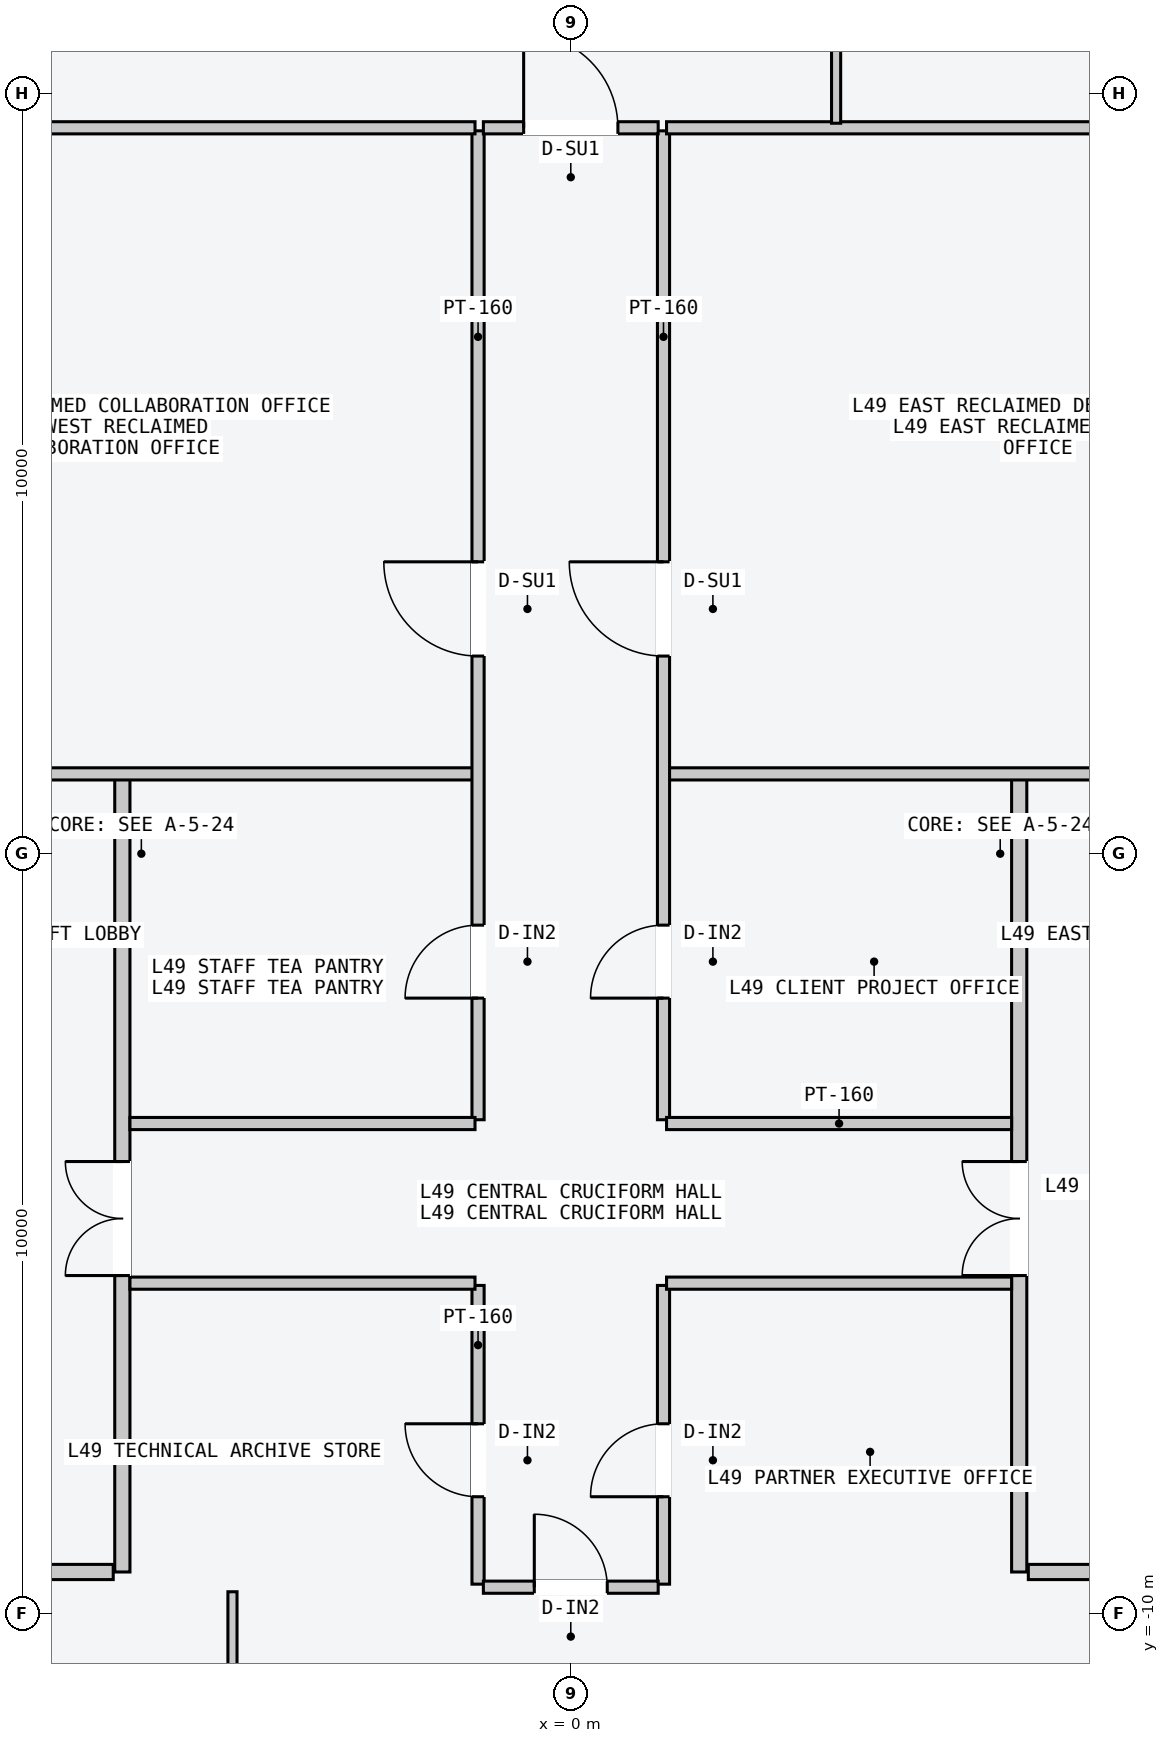
"""IFC4 building model, lengths in metres.
Left out: names, types, materials, properties, quantities, classifications, styles, units other than length and angle.
Written with IfcOpenShell. Run it as: python <this file> out.ifc"""

import sys

from ifc_helpers import new_model, si_unit, direction, frame, frame_2d, origin, place, context, subcontext, project, spatial, rectangle, extrude, element, fill, save


model = new_model("IFC4")
c1 = context("Model", 3, precision=1e-05, world=origin(), true_north=direction((0.0, 1.0)))
c2 = subcontext(c1, "Body", "Model", "MODEL_VIEW")
j1 = project(units=[si_unit("LENGTHUNIT", "METRE"), si_unit("PLANEANGLEUNIT", "RADIAN")], contexts=[c1])
p1 = place(None, origin())
s1 = spatial("IfcSite", under=j1, at=p1, CompositionType="ELEMENT")
p2 = place(p1, origin())
s2 = spatial("IfcBuilding", under=s1, at=p2, CompositionType="ELEMENT")
p3 = place(p2, frame((0.0, 0.0, 187.5)))
s3 = spatial("IfcBuildingStorey", under=s2, at=p3, CompositionType="ELEMENT", Elevation=187.5)
p4 = place(p3, frame((-5.9, -9.45, 0.0), z_axis=(0.0, 0.0, 1.0), x_axis=(0.0, 1.0, 0.0)))
e1 = element("IfcWall", 1, at=p4, inside=s3, PredefinedType="PARTITIONING", context=c2, shape_type="SweptSolid", body=[
    extrude(rectangle(XDim=10.5, YDim=0.2, at=frame_2d((5.25, 0.0))), origin(), (0.0, 0.0, 1.0), 3.4),
])
p5 = place(p4, frame((3.9, 0.0, 0.0)))
e2 = element("IfcOpeningElement", 2, at=p5, cuts=e1, PredefinedType="OPENING", context=c2, shape_type="SweptSolid", body=[
    extrude(rectangle(XDim=1.5, YDim=2.2, at=frame_2d((0.75, 1.1))), frame((0.0, 0.11, 0.0), z_axis=(0.0, -1.0, 0.0), x_axis=(1.0, 0.0, 0.0)), (0.0, 0.0, 1.0), 0.22),
])
p6 = place(p3, frame((-6.02, -9.45, 0.0), z_axis=(0.0, 0.0, 1.0), x_axis=(-1.0, 0.0, 0.0)))
e3 = element("IfcWall", 3, at=p6, inside=s3, PredefinedType="PARTITIONING", context=c2, shape_type="SweptSolid", body=[
    extrude(rectangle(XDim=1.8, YDim=0.2, at=frame_2d((0.9, 0.0))), origin(), (0.0, 0.0, 1.0), 3.4),
])
p7 = place(p3, frame((5.9, -9.45, 0.0), z_axis=(0.0, 0.0, 1.0), x_axis=(0.0, 1.0, 0.0)))
e4 = element("IfcWall", 4, at=p7, inside=s3, PredefinedType="PARTITIONING", context=c2, shape_type="SweptSolid", body=[
    extrude(rectangle(XDim=10.5, YDim=0.2, at=frame_2d((5.25, 0.0))), origin(), (0.0, 0.0, 1.0), 3.4),
])
p8 = place(p7, frame((3.9, 0.0, 0.0)))
e5 = element("IfcOpeningElement", 5, at=p8, cuts=e4, PredefinedType="OPENING", context=c2, shape_type="SweptSolid", body=[
    extrude(rectangle(XDim=1.5, YDim=2.2, at=frame_2d((0.75, 1.1))), frame((0.0, 0.11, 0.0), z_axis=(0.0, -1.0, 0.0), x_axis=(1.0, 0.0, 0.0)), (0.0, 0.0, 1.0), 0.22),
])
p9 = place(p3, frame((6.02, -9.45, 0.0), z_axis=(0.0, 0.0, 1.0), x_axis=(1.0, 0.0, 0.0)))
e6 = element("IfcWall", 6, at=p9, inside=s3, PredefinedType="PARTITIONING", context=c2, shape_type="SweptSolid", body=[
    extrude(rectangle(XDim=1.8, YDim=0.2, at=frame_2d((0.9, 0.0))), origin(), (0.0, 0.0, 1.0), 3.4),
])
p10 = place(p3, frame((-10.05, 1.05, 0.0), z_axis=(0.0, 0.0, 1.0), x_axis=(1.0, 0.0, 0.0)))
e7 = element("IfcWall", 7, at=p10, inside=s3, PredefinedType="PARTITIONING", context=c2, shape_type="SweptSolid", body=[
    extrude(rectangle(XDim=8.79, YDim=0.16, at=frame_2d((4.395, 0.0))), origin(), (0.0, 0.0, 1.0), 3.4),
])
p11 = place(p3, frame((-1.22, -3.5, 0.0), z_axis=(0.0, 0.0, 1.0), x_axis=(0.0, 1.0, 0.0)))
e8 = element("IfcWall", 8, at=p11, inside=s3, PredefinedType="PARTITIONING", context=c2, shape_type="SweptSolid", body=[
    extrude(rectangle(XDim=13.01, YDim=0.16, at=frame_2d((6.505, 0.0))), origin(), (0.0, 0.0, 1.0), 3.4),
])
p12 = place(p11, frame((6.1, 0.0, 0.0)))
e9 = element("IfcOpeningElement", 9, at=p12, cuts=e8, PredefinedType="OPENING", context=c2, shape_type="SweptSolid", body=[
    extrude(rectangle(XDim=1.24, YDim=2.24, at=frame_2d((0.62, 1.12))), frame((0.0, 0.09, 0.0), z_axis=(0.0, -1.0, 0.0), x_axis=(1.0, 0.0, 0.0)), (0.0, 0.0, 1.0), 0.18),
])
p13 = place(p11, frame((1.6, 0.0, 0.0)))
e10 = element("IfcOpeningElement", 10, at=p13, cuts=e8, PredefinedType="OPENING", context=c2, shape_type="SweptSolid", body=[
    extrude(rectangle(XDim=0.96, YDim=2.18, at=frame_2d((0.48, 1.09))), frame((0.0, 0.09, 0.0), z_axis=(0.0, -1.0, 0.0), x_axis=(1.0, 0.0, 0.0)), (0.0, 0.0, 1.0), 0.18),
])
p14 = place(p3, frame((-7.5, 9.55, 0.0), z_axis=(0.0, 0.0, 1.0), x_axis=(1.0, 0.0, 0.0)))
e11 = element("IfcWall", 11, at=p14, inside=s3, PredefinedType="PARTITIONING", context=c2, shape_type="SweptSolid", body=[
    extrude(rectangle(XDim=6.24, YDim=0.16, at=frame_2d((3.12, 0.0))), origin(), (0.0, 0.0, 1.0), 3.4),
])
p15 = place(p3, frame((-5.8, -3.55, 0.0), z_axis=(0.0, 0.0, 1.0), x_axis=(1.0, 0.0, 0.0)))
e12 = element("IfcWall", 12, at=p15, inside=s3, PredefinedType="PARTITIONING", context=c2, shape_type="SweptSolid", body=[
    extrude(rectangle(XDim=4.54, YDim=0.16, at=frame_2d((2.27, 0.0))), origin(), (0.0, 0.0, 1.0), 3.4),
])
p16 = place(p3, frame((1.26, 1.05, 0.0), z_axis=(0.0, 0.0, 1.0), x_axis=(1.0, 0.0, 0.0)))
e13 = element("IfcWall", 13, at=p16, inside=s3, PredefinedType="PARTITIONING", context=c2, shape_type="SweptSolid", body=[
    extrude(rectangle(XDim=8.8, YDim=0.16, at=frame_2d((4.4, 0.0))), origin(), (0.0, 0.0, 1.0), 3.4),
])
p17 = place(p3, frame((1.22, -3.5, 0.0), z_axis=(0.0, 0.0, 1.0), x_axis=(0.0, 1.0, 0.0)))
e14 = element("IfcWall", 14, at=p17, inside=s3, PredefinedType="PARTITIONING", context=c2, shape_type="SweptSolid", body=[
    extrude(rectangle(XDim=13.01, YDim=0.16, at=frame_2d((6.505, 0.0))), origin(), (0.0, 0.0, 1.0), 3.4),
])
p18 = place(p17, frame((6.1, 0.0, 0.0)))
e15 = element("IfcOpeningElement", 15, at=p18, cuts=e14, PredefinedType="OPENING", context=c2, shape_type="SweptSolid", body=[
    extrude(rectangle(XDim=1.24, YDim=2.24, at=frame_2d((0.62, 1.12))), frame((0.0, 0.09, 0.0), z_axis=(0.0, -1.0, 0.0), x_axis=(1.0, 0.0, 0.0)), (0.0, 0.0, 1.0), 0.18),
])
p19 = place(p17, frame((1.6, 0.0, 0.0)))
e16 = element("IfcOpeningElement", 16, at=p19, cuts=e14, PredefinedType="OPENING", context=c2, shape_type="SweptSolid", body=[
    extrude(rectangle(XDim=0.96, YDim=2.18, at=frame_2d((0.48, 1.09))), frame((0.0, 0.09, 0.0), z_axis=(0.0, -1.0, 0.0), x_axis=(1.0, 0.0, 0.0)), (0.0, 0.0, 1.0), 0.18),
])
p20 = place(p3, frame((1.26, 9.55, 0.0), z_axis=(0.0, 0.0, 1.0), x_axis=(1.0, 0.0, 0.0)))
e17 = element("IfcWall", 17, at=p20, inside=s3, PredefinedType="PARTITIONING", context=c2, shape_type="SweptSolid", body=[
    extrude(rectangle(XDim=6.24, YDim=0.16, at=frame_2d((3.12, 0.0))), origin(), (0.0, 0.0, 1.0), 3.4),
])
p21 = place(p3, frame((1.26, -3.55, 0.0), z_axis=(0.0, 0.0, 1.0), x_axis=(1.0, 0.0, 0.0)))
e18 = element("IfcWall", 18, at=p21, inside=s3, PredefinedType="PARTITIONING", context=c2, shape_type="SweptSolid", body=[
    extrude(rectangle(XDim=4.54, YDim=0.16, at=frame_2d((2.27, 0.0))), origin(), (0.0, 0.0, 1.0), 3.4),
])
p22 = place(p3, frame((-1.22, -9.61, 0.0), z_axis=(0.0, 0.0, 1.0), x_axis=(0.0, 1.0, 0.0)))
e19 = element("IfcWall", 19, at=p22, inside=s3, PredefinedType="PARTITIONING", context=c2, shape_type="SweptSolid", body=[
    extrude(rectangle(XDim=3.93, YDim=0.16, at=frame_2d((1.965, 0.0))), origin(), (0.0, 0.0, 1.0), 3.4),
])
p23 = place(p22, frame((1.15, 0.0, 0.0)))
e20 = element("IfcOpeningElement", 20, at=p23, cuts=e19, PredefinedType="OPENING", context=c2, shape_type="SweptSolid", body=[
    extrude(rectangle(XDim=0.96, YDim=2.18, at=frame_2d((0.48, 1.09))), frame((0.0, 0.09, 0.0), z_axis=(0.0, -1.0, 0.0), x_axis=(1.0, 0.0, 0.0)), (0.0, 0.0, 1.0), 0.18),
])
p24 = place(p3, frame((1.22, -9.61, 0.0), z_axis=(0.0, 0.0, 1.0), x_axis=(0.0, 1.0, 0.0)))
e21 = element("IfcWall", 21, at=p24, inside=s3, PredefinedType="PARTITIONING", context=c2, shape_type="SweptSolid", body=[
    extrude(rectangle(XDim=3.93, YDim=0.16, at=frame_2d((1.965, 0.0))), origin(), (0.0, 0.0, 1.0), 3.4),
])
p25 = place(p24, frame((1.15, 0.0, 0.0)))
e22 = element("IfcOpeningElement", 22, at=p25, cuts=e21, PredefinedType="OPENING", context=c2, shape_type="SweptSolid", body=[
    extrude(rectangle(XDim=0.96, YDim=2.18, at=frame_2d((0.48, 1.09))), frame((0.0, 0.09, 0.0), z_axis=(0.0, -1.0, 0.0), x_axis=(1.0, 0.0, 0.0)), (0.0, 0.0, 1.0), 0.18),
])
for number, where, z_axis, x_axis in (
    (23, (-5.8, -5.65, 0.0), (0.0, 0.0, 1.0), (1.0, 0.0, 0.0)),
    (24, (1.26, -5.65, 0.0), (0.0, 0.0, 1.0), (1.0, 0.0, 0.0)),
):
    element("IfcWall", number, at=place(p3, frame(where, z_axis=z_axis, x_axis=x_axis)), inside=s3, PredefinedType="PARTITIONING", context=c2, shape_type="SweptSolid", body=[
        extrude(rectangle(XDim=4.54, YDim=0.16, at=frame_2d((2.27, 0.0))), origin(), (0.0, 0.0, 1.0), 3.4),
    ])
p26 = place(p3, frame((3.491, 9.61, 0.0), z_axis=(0.0, 0.0, 1.0), x_axis=(0.0, 1.0, 0.0)))
e25 = element("IfcWall", 25, at=p26, inside=s3, PredefinedType="PARTITIONING", context=c2, shape_type="SweptSolid", body=[
    extrude(rectangle(XDim=8.95, YDim=0.12, at=frame_2d((4.475, 0.0))), origin(), (0.0, 0.0, 1.0), 3.4),
])
p27 = place(p26, frame((1.15, 0.0, 0.0)))
e26 = element("IfcOpeningElement", 26, at=p27, cuts=e25, PredefinedType="OPENING", context=c2, shape_type="SweptSolid", body=[
    extrude(rectangle(XDim=0.96, YDim=2.18, at=frame_2d((0.48, 1.09))), frame((0.0, 0.07, 0.0), z_axis=(0.0, -1.0, 0.0), x_axis=(1.0, 0.0, 0.0)), (0.0, 0.0, 1.0), 0.14),
])
p28 = place(p3, frame((-1.15, 9.55, 0.0), z_axis=(0.0, 0.0, 1.0), x_axis=(1.0, 0.0, 0.0)))
e27 = element("IfcWall", 27, at=p28, inside=s3, PredefinedType="PARTITIONING", context=c2, shape_type="SweptSolid", body=[
    extrude(rectangle(XDim=2.3, YDim=0.16, at=frame_2d((1.15, 0.0))), origin(), (0.0, 0.0, 1.0), 3.4),
])
p29 = place(p28, frame((0.53, 0.0, 0.0)))
e28 = element("IfcOpeningElement", 28, at=p29, cuts=e27, PredefinedType="OPENING", context=c2, shape_type="SweptSolid", body=[
    extrude(rectangle(XDim=1.24, YDim=2.24, at=frame_2d((0.62, 1.12))), frame((0.0, 0.09, 0.0), z_axis=(0.0, -1.0, 0.0), x_axis=(1.0, 0.0, 0.0)), (0.0, 0.0, 1.0), 0.18),
])
p30 = place(p3, frame((-4.451, -18.56, 0.0), z_axis=(0.0, 0.0, 1.0), x_axis=(0.0, 1.0, 0.0)))
e29 = element("IfcWall", 29, at=p30, inside=s3, PredefinedType="PARTITIONING", context=c2, shape_type="SweptSolid", body=[
    extrude(rectangle(XDim=8.85, YDim=0.12, at=frame_2d((4.425, 0.0))), origin(), (0.0, 0.0, 1.0), 3.4),
])
p31 = place(p30, frame((1.05, 0.0, 0.0)))
e30 = element("IfcOpeningElement", 30, at=p31, cuts=e29, PredefinedType="OPENING", context=c2, shape_type="SweptSolid", body=[
    extrude(rectangle(XDim=0.96, YDim=2.18, at=frame_2d((0.48, 1.09))), frame((0.0, 0.07, 0.0), z_axis=(0.0, -1.0, 0.0), x_axis=(1.0, 0.0, 0.0)), (0.0, 0.0, 1.0), 0.14),
])
p32 = place(p3, frame((-1.15, -9.65, 0.0), z_axis=(0.0, 0.0, 1.0), x_axis=(1.0, 0.0, 0.0)))
e31 = element("IfcWall", 31, at=p32, inside=s3, PredefinedType="PARTITIONING", context=c2, shape_type="SweptSolid", body=[
    extrude(rectangle(XDim=2.3, YDim=0.16, at=frame_2d((1.15, 0.0))), origin(), (0.0, 0.0, 1.0), 2.75),
])
p33 = place(p32, frame((0.67, 0.0, 0.0)))
e32 = element("IfcOpeningElement", 32, at=p33, cuts=e31, PredefinedType="OPENING", context=c2, shape_type="SweptSolid", body=[
    extrude(rectangle(XDim=0.96, YDim=2.18, at=frame_2d((0.48, 1.09))), frame((0.0, 0.09, 0.0), z_axis=(0.0, -1.0, 0.0), x_axis=(1.0, 0.0, 0.0)), (0.0, 0.0, 1.0), 0.18),
])
p34 = place(p5, origin())
e33 = element("IfcDoor", 33, at=p34, inside=s3, OperationType="DOUBLE_DOOR_SINGLE_SWING", PredefinedType="DOOR", context=c2, shape_type="SweptSolid", body=[
    extrude(rectangle(XDim=1.5, YDim=2.2, at=frame_2d((0.75, 1.1))), frame((0.0, 0.025, 0.0), z_axis=(0.0, -1.0, 0.0), x_axis=(1.0, 0.0, 0.0)), (0.0, 0.0, 1.0), 0.05),
])
fill(e2, e33)
p35 = place(p8, origin())
e34 = element("IfcDoor", 34, at=p35, inside=s3, OperationType="DOUBLE_DOOR_SINGLE_SWING", PredefinedType="DOOR", context=c2, shape_type="SweptSolid", body=[
    extrude(rectangle(XDim=1.5, YDim=2.2, at=frame_2d((0.75, 1.1))), frame((0.0, 0.025, 0.0), z_axis=(0.0, -1.0, 0.0), x_axis=(1.0, 0.0, 0.0)), (0.0, 0.0, 1.0), 0.05),
])
fill(e5, e34)
p36 = place(p12, origin())
e35 = element("IfcDoor", 35, at=p36, inside=s3, OperationType="SINGLE_SWING_RIGHT", PredefinedType="DOOR", context=c2, shape_type="SweptSolid", body=[
    extrude(rectangle(XDim=1.24, YDim=2.24, at=frame_2d((0.62, 1.12))), frame((0.0, 0.025, 0.0), z_axis=(0.0, -1.0, 0.0), x_axis=(1.0, 0.0, 0.0)), (0.0, 0.0, 1.0), 0.05),
])
fill(e9, e35)
p37 = place(p13, origin())
e36 = element("IfcDoor", 36, at=p37, inside=s3, OperationType="SINGLE_SWING_LEFT", PredefinedType="DOOR", context=c2, shape_type="SweptSolid", body=[
    extrude(rectangle(XDim=0.96, YDim=2.18, at=frame_2d((0.48, 1.09))), frame((0.0, 0.025, 0.0), z_axis=(0.0, -1.0, 0.0), x_axis=(1.0, 0.0, 0.0)), (0.0, 0.0, 1.0), 0.05),
])
fill(e10, e36)
p38 = place(p18, origin())
e37 = element("IfcDoor", 37, at=p38, inside=s3, OperationType="SINGLE_SWING_RIGHT", PredefinedType="DOOR", context=c2, shape_type="SweptSolid", body=[
    extrude(rectangle(XDim=1.24, YDim=2.24, at=frame_2d((0.62, 1.12))), frame((0.0, 0.025, 0.0), z_axis=(0.0, -1.0, 0.0), x_axis=(1.0, 0.0, 0.0)), (0.0, 0.0, 1.0), 0.05),
])
fill(e15, e37)
p39 = place(p19, origin())
e38 = element("IfcDoor", 38, at=p39, inside=s3, OperationType="SINGLE_SWING_LEFT", PredefinedType="DOOR", context=c2, shape_type="SweptSolid", body=[
    extrude(rectangle(XDim=0.96, YDim=2.18, at=frame_2d((0.48, 1.09))), frame((0.0, 0.025, 0.0), z_axis=(0.0, -1.0, 0.0), x_axis=(1.0, 0.0, 0.0)), (0.0, 0.0, 1.0), 0.05),
])
fill(e16, e38)
p40 = place(p23, origin())
e39 = element("IfcDoor", 39, at=p40, inside=s3, OperationType="SINGLE_SWING_RIGHT", PredefinedType="DOOR", context=c2, shape_type="SweptSolid", body=[
    extrude(rectangle(XDim=0.96, YDim=2.18, at=frame_2d((0.48, 1.09))), frame((0.0, 0.025, 0.0), z_axis=(0.0, -1.0, 0.0), x_axis=(1.0, 0.0, 0.0)), (0.0, 0.0, 1.0), 0.05),
])
fill(e20, e39)
p41 = place(p25, origin())
e40 = element("IfcDoor", 40, at=p41, inside=s3, OperationType="SINGLE_SWING_LEFT", PredefinedType="DOOR", context=c2, shape_type="SweptSolid", body=[
    extrude(rectangle(XDim=0.96, YDim=2.18, at=frame_2d((0.48, 1.09))), frame((0.0, 0.025, 0.0), z_axis=(0.0, -1.0, 0.0), x_axis=(1.0, 0.0, 0.0)), (0.0, 0.0, 1.0), 0.05),
])
fill(e22, e40)
p42 = place(p29, origin())
e41 = element("IfcDoor", 41, at=p42, inside=s3, OperationType="SINGLE_SWING_LEFT", PredefinedType="DOOR", context=c2, shape_type="SweptSolid", body=[
    extrude(rectangle(XDim=1.24, YDim=2.24, at=frame_2d((0.62, 1.12))), frame((0.0, 0.025, 0.0), z_axis=(0.0, -1.0, 0.0), x_axis=(1.0, 0.0, 0.0)), (0.0, 0.0, 1.0), 0.05),
])
fill(e28, e41)
p43 = place(p33, origin())
e42 = element("IfcDoor", 42, at=p43, inside=s3, OperationType="SINGLE_SWING_LEFT", PredefinedType="DOOR", context=c2, shape_type="SweptSolid", body=[
    extrude(rectangle(XDim=0.96, YDim=2.18, at=frame_2d((0.48, 1.09))), frame((0.0, 0.025, 0.0), z_axis=(0.0, -1.0, 0.0), x_axis=(1.0, 0.0, 0.0)), (0.0, 0.0, 1.0), 0.05),
])
fill(e32, e42)
save(model, sys.argv[1])
